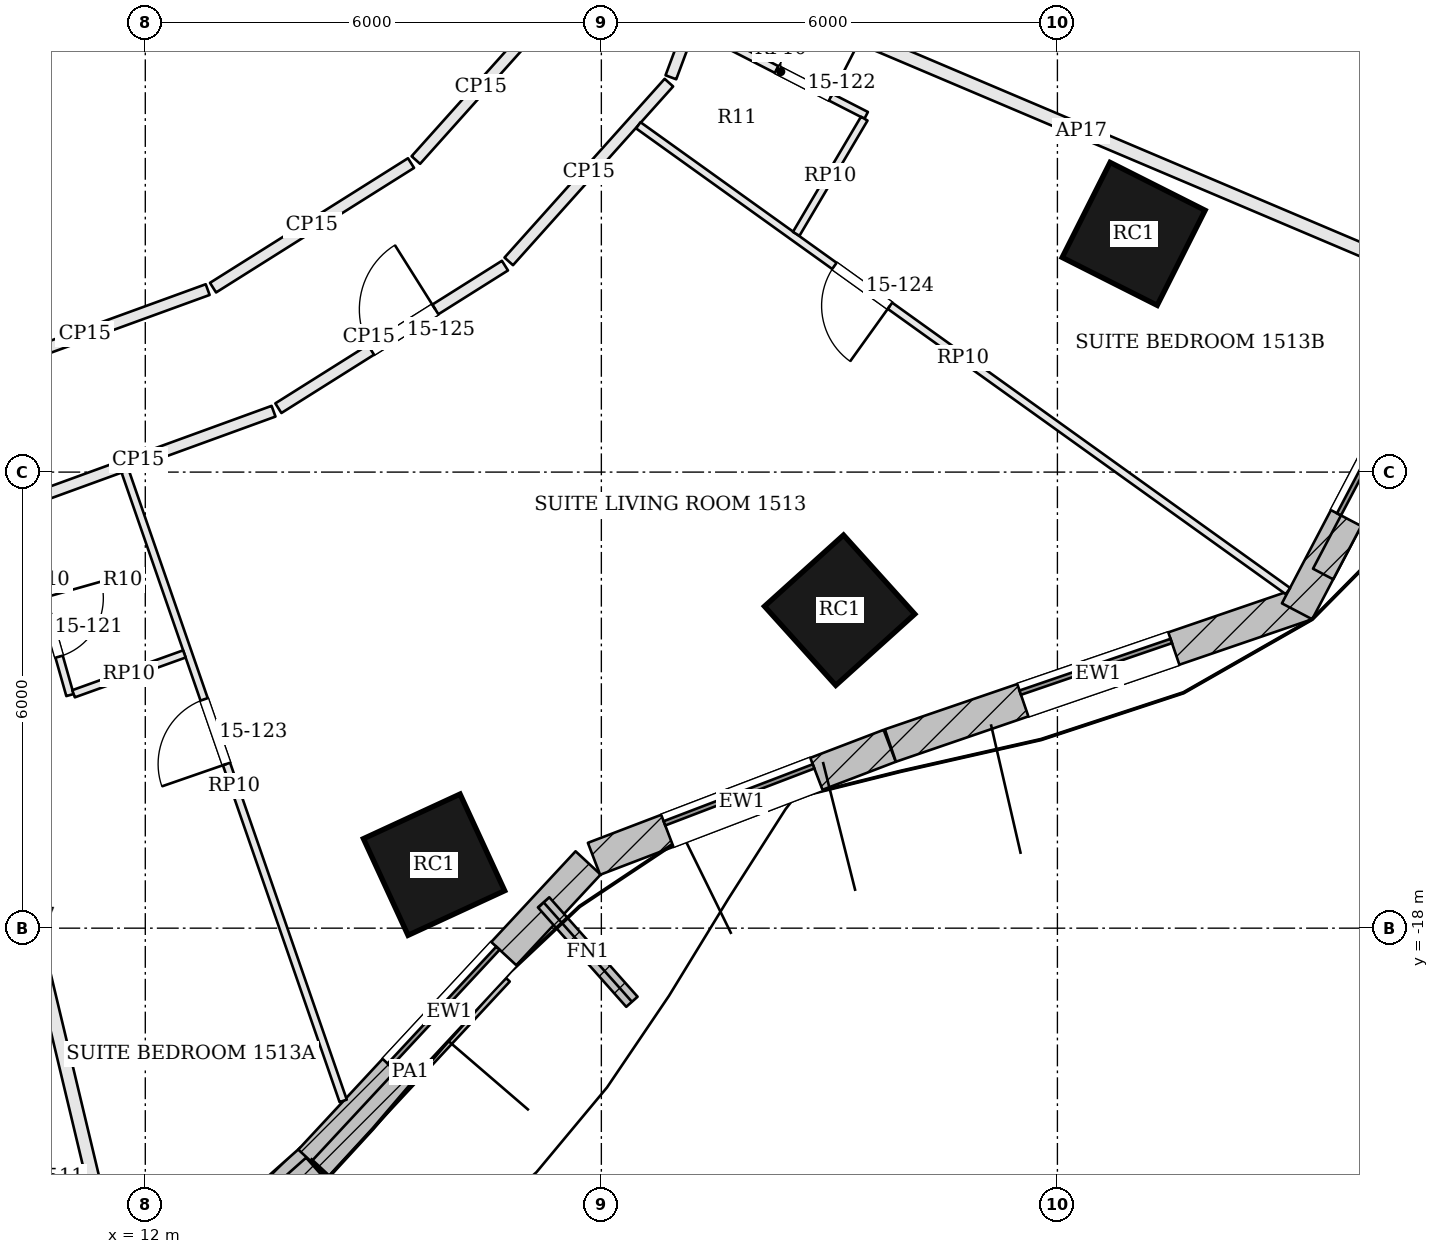
"""IFC4 building model, lengths in metres.
Left out: names, types, materials, properties, quantities, classifications, styles, units other than length and angle.
Written with IfcOpenShell. Run it as: python <this file> out.ifc"""

import sys

from ifc_helpers import new_model, si_unit, direction, frame, frame_2d, origin, origin_2d, place, context, subcontext, project, spatial, rectangle, extrude, element, fill, save


model = new_model("IFC4")
c1 = context("Model", 3, precision=1e-05, world=origin(), true_north=direction((0.0, 1.0)))
c2 = subcontext(c1, "Body", "Model", "MODEL_VIEW")
j1 = project(units=[si_unit("LENGTHUNIT", "METRE"), si_unit("PLANEANGLEUNIT", "RADIAN")], contexts=[c1])
p1 = place(None, origin())
s1 = spatial("IfcSite", under=j1, at=p1, CompositionType="ELEMENT")
p2 = place(p1, origin())
s2 = spatial("IfcBuilding", under=s1, at=p2, CompositionType="ELEMENT")
p3 = place(p2, frame((0.0, 0.0, 69.9)))
s3 = spatial("IfcBuildingStorey", under=s2, at=p3, CompositionType="ELEMENT", Elevation=69.9)
for number, where, z_axis, x_axis in (
    (1, (15.799, -17.165, 0.0), (0.0, 0.0, 1.0), (0.908, 0.419, 0.0)),
    (2, (21.135, -13.817, 0.0), (0.0, 0.0, 1.0), (0.743, 0.67, 0.0)),
    (3, (25.003, -8.866, 0.0), (0.0, 0.0, 1.0), (0.45, 0.893, 0.0)),
):
    element("IfcColumn", number, at=place(p3, frame(where, z_axis=z_axis, x_axis=x_axis)), inside=s3, PredefinedType="COLUMN", context=c2, shape_type="SweptSolid", body=[
        extrude(rectangle(XDim=1.4, YDim=1.4, at=origin_2d()), origin(), (0.0, 0.0, 1.0), 3.6),
    ])
p4 = place(p3, frame((11.763, -23.212, 0.0), z_axis=(0.0, 0.0, 1.0), x_axis=(0.74723528797, 0.664559571755, 0.0)))
e4 = element("IfcWall", 4, at=p4, inside=s3, PredefinedType="SOLIDWALL", context=c2, shape_type="SweptSolid", body=[
    extrude(rectangle(XDim=3.251, YDim=0.45, at=frame_2d((1.625, 0.0))), origin(), (0.0, 0.0, 1.0), 3.4),
])
p5 = place(p4, frame((0.576, 0.0, 0.9)))
e5 = element("IfcOpeningElement", 5, at=p5, cuts=e4, PredefinedType="OPENING", context=c2, shape_type="SweptSolid", body=[
    extrude(rectangle(XDim=2.1, YDim=2.0, at=frame_2d((1.05, 1.0))), frame((0.0, 0.235, 0.0), z_axis=(0.0, -1.0, 0.0), x_axis=(1.0, 0.0, 0.0)), (0.0, 0.0, 1.0), 0.47),
])
p6 = place(p3, frame((14.177, -21.066, 0.0), z_axis=(0.0, 0.0, 1.0), x_axis=(0.680847709714, 0.732425010617, 0.0)))
e6 = element("IfcWall", 6, at=p6, inside=s3, PredefinedType="SOLIDWALL", context=c2, shape_type="SweptSolid", body=[
    extrude(rectangle(XDim=5.358, YDim=0.45, at=frame_2d((2.679, 0.0))), origin(), (0.0, 0.0, 1.0), 3.4),
])
p7 = place(p6, frame((1.629, 0.0, 0.9)))
e7 = element("IfcOpeningElement", 7, at=p7, cuts=e6, PredefinedType="OPENING", context=c2, shape_type="SweptSolid", body=[
    extrude(rectangle(XDim=2.1, YDim=2.0, at=frame_2d((1.05, 1.0))), frame((0.0, 0.235, 0.0), z_axis=(0.0, -1.0, 0.0), x_axis=(1.0, 0.0, 0.0)), (0.0, 0.0, 1.0), 0.47),
])
p8 = place(p3, frame((17.903, -17.087, 0.0), z_axis=(0.0, 0.0, 1.0), x_axis=(0.934145554025, 0.356892258105, 0.0)))
e8 = element("IfcWall", 8, at=p8, inside=s3, PredefinedType="SOLIDWALL", context=c2, shape_type="SweptSolid", body=[
    extrude(rectangle(XDim=4.165, YDim=0.45, at=frame_2d((2.082, 0.0))), origin(), (0.0, 0.0, 1.0), 3.4),
])
p9 = place(p8, frame((1.032, 0.0, 0.9)))
e9 = element("IfcOpeningElement", 9, at=p9, cuts=e8, PredefinedType="OPENING", context=c2, shape_type="SweptSolid", body=[
    extrude(rectangle(XDim=2.1, YDim=2.0, at=frame_2d((1.05, 1.0))), frame((0.0, 0.235, 0.0), z_axis=(0.0, -1.0, 0.0), x_axis=(1.0, 0.0, 0.0)), (0.0, 0.0, 1.0), 0.47),
])
p10 = place(p3, frame((21.803, -15.597, 0.0), z_axis=(0.0, 0.0, 1.0), x_axis=(0.946115314877, 0.323829910532, 0.0)))
e10 = element("IfcWall", 10, at=p10, inside=s3, PredefinedType="SOLIDWALL", context=c2, shape_type="SweptSolid", body=[
    extrude(rectangle(XDim=5.782, YDim=0.45, at=frame_2d((2.891, 0.0))), origin(), (0.0, 0.0, 1.0), 3.4),
])
p11 = place(p10, frame((1.841, 0.0, 0.9)))
e11 = element("IfcOpeningElement", 11, at=p11, cuts=e10, PredefinedType="OPENING", context=c2, shape_type="SweptSolid", body=[
    extrude(rectangle(XDim=2.1, YDim=2.0, at=frame_2d((1.05, 1.0))), frame((0.0, 0.235, 0.0), z_axis=(0.0, -1.0, 0.0), x_axis=(1.0, 0.0, 0.0)), (0.0, 0.0, 1.0), 0.47),
])
p12 = place(p3, frame((27.153, -13.831, 0.0), z_axis=(0.0, 0.0, 1.0), x_axis=(0.465165872942, 0.885223537108, 0.0)))
e12 = element("IfcWall", 12, at=p12, inside=s3, PredefinedType="SOLIDWALL", context=c2, shape_type="SweptSolid", body=[
    extrude(rectangle(XDim=4.871, YDim=0.45, at=frame_2d((2.436, 0.0))), origin(), (0.0, 0.0, 1.0), 3.4),
])
p13 = place(p12, frame((1.385, 0.0, 0.9)))
e13 = element("IfcOpeningElement", 13, at=p13, cuts=e12, PredefinedType="OPENING", context=c2, shape_type="SweptSolid", body=[
    extrude(rectangle(XDim=2.1, YDim=2.0, at=frame_2d((1.05, 1.0))), frame((0.0, 0.235, 0.0), z_axis=(0.0, -1.0, 0.0), x_axis=(1.0, 0.0, 0.0)), (0.0, 0.0, 1.0), 0.47),
])
p14 = place(p3, frame((17.24, -17.66, 0.0), z_axis=(0.0, 0.0, 1.0), x_axis=(0.664017424016, -0.747717099312, 0.0)))
e14 = element("IfcWall", 14, at=p14, inside=s3, PredefinedType="SOLIDWALL", context=c2, shape_type="SweptSolid", body=[
    extrude(rectangle(XDim=1.75, YDim=0.2, at=frame_2d((0.875, 0.0))), origin(), (0.0, 0.0, 1.0), 3.4),
])
p15 = place(p3, frame((11.898, -23.192, 3.6), z_axis=(0.0, 0.0, 1.0), x_axis=(0.74726596591, 0.664525075669, 0.0)))
e15 = element("IfcWall", 15, at=p15, inside=s3, PredefinedType="PARAPET", context=c2, shape_type="SweptSolid", body=[
    extrude(rectangle(XDim=3.101, YDim=0.3, at=frame_2d((1.551, 0.0))), origin(), (0.0, 0.0, 1.0), 1.1),
])
p16 = place(p3, frame((14.293, -21.174, 3.6), z_axis=(0.0, 0.0, 1.0), x_axis=(0.680821476217, 0.732449395877, 0.0)))
e16 = element("IfcWall", 16, at=p16, inside=s3, PredefinedType="PARAPET", context=c2, shape_type="SweptSolid", body=[
    extrude(rectangle(XDim=3.513, YDim=0.3, at=frame_2d((1.757, 0.0))), origin(), (0.0, 0.0, 1.0), 1.1),
])
p17 = place(p3, frame((27.495, -13.341, 3.6), z_axis=(0.0, 0.0, 1.0), x_axis=(0.46519687666, 0.88520724463, 0.0)))
e17 = element("IfcWall", 17, at=p17, inside=s3, PredefinedType="PARAPET", context=c2, shape_type="SweptSolid", body=[
    extrude(rectangle(XDim=4.139, YDim=0.3, at=frame_2d((2.069, 0.0))), origin(), (0.0, 0.0, 1.0), 1.1),
])
p18 = place(p3, frame((11.707, -22.956, 0.0), z_axis=(0.0, 0.0, 1.0), x_axis=(-0.232380654268, 0.972624918209, 0.0)))
e18 = element("IfcWall", 18, at=p18, inside=s3, PredefinedType="PARTITIONING", context=c2, shape_type="SweptSolid", body=[
    extrude(rectangle(XDim=10.507, YDim=0.175, at=frame_2d((5.253, 0.0))), origin(), (0.0, 0.0, 1.0), 2.68),
])
p19 = place(p3, frame((10.128, -12.494, 0.0), z_axis=(0.0, 0.0, 1.0), x_axis=(0.939720005412, 0.341944895309, 0.0)))
e19 = element("IfcWall", 19, at=p19, inside=s3, PredefinedType="PARTITIONING", context=c2, shape_type="SweptSolid", body=[
    extrude(rectangle(XDim=3.788, YDim=0.15, at=frame_2d((1.894, 0.0))), origin(), (0.0, 0.0, 1.0), 2.68),
])
p20 = place(p3, frame((13.751, -11.159, 0.0), z_axis=(0.0, 0.0, 1.0), x_axis=(0.846413381026, 0.532526420396, 0.0)))
e20 = element("IfcWall", 20, at=p20, inside=s3, PredefinedType="PARTITIONING", context=c2, shape_type="SweptSolid", body=[
    extrude(rectangle(XDim=3.522, YDim=0.15, at=frame_2d((1.761, 0.0))), origin(), (0.0, 0.0, 1.0), 2.68),
])
p21 = place(p20, frame((1.44, 0.0, 0.0)))
e21 = element("IfcOpeningElement", 21, at=p21, cuts=e20, PredefinedType="OPENING", context=c2, shape_type="SweptSolid", body=[
    extrude(rectangle(XDim=1.0, YDim=2.1, at=frame_2d((0.5, 1.05))), frame((0.0, 0.085, 0.0), z_axis=(0.0, -1.0, 0.0), x_axis=(1.0, 0.0, 0.0)), (0.0, 0.0, 1.0), 0.17),
])
p22 = place(p3, frame((16.781, -9.228, 0.0), z_axis=(0.0, 0.0, 1.0), x_axis=(0.667305516611, 0.744784094554, 0.0)))
e22 = element("IfcWall", 22, at=p22, inside=s3, PredefinedType="PARTITIONING", context=c2, shape_type="SweptSolid", body=[
    extrude(rectangle(XDim=3.157, YDim=0.15, at=frame_2d((1.579, 0.0))), origin(), (0.0, 0.0, 1.0), 2.68),
])
p23 = place(p3, frame((18.915, -6.806, 0.0), z_axis=(0.0, 0.0, 1.0), x_axis=(0.349345122546, 0.936994122368, 0.0)))
e23 = element("IfcWall", 23, at=p23, inside=s3, PredefinedType="PARTITIONING", context=c2, shape_type="SweptSolid", body=[
    extrude(rectangle(XDim=1.46, YDim=0.15, at=frame_2d((0.73, 0.0))), origin(), (0.0, 0.0, 1.0), 2.68),
])
p24 = place(p3, frame((29.139, -9.557, 0.0), z_axis=(0.0, 0.0, 1.0), x_axis=(-0.920644988054, 0.390400827318, 0.0)))
e24 = element("IfcWall", 24, at=p24, inside=s3, PredefinedType="PARTITIONING", context=c2, shape_type="SweptSolid", body=[
    extrude(rectangle(XDim=10.477, YDim=0.175, at=frame_2d((5.238, 0.0))), origin(), (0.0, 0.0, 1.0), 2.68),
])
p25 = place(p3, frame((17.271, -5.984, 0.0), z_axis=(0.0, 0.0, 1.0), x_axis=(-0.667301130907, -0.744788023997, 0.0)))
e25 = element("IfcWall", 25, at=p25, inside=s3, PredefinedType="PARTITIONING", context=c2, shape_type="SweptSolid", body=[
    extrude(rectangle(XDim=2.565, YDim=0.15, at=frame_2d((1.282, 0.0))), origin(), (0.0, 0.0, 1.0), 2.68),
])
p26 = place(p3, frame((15.496, -7.934, 0.0), z_axis=(0.0, 0.0, 1.0), x_axis=(-0.846358667139, -0.532613374371, 0.0)))
e26 = element("IfcWall", 26, at=p26, inside=s3, PredefinedType="PARTITIONING", context=c2, shape_type="SweptSolid", body=[
    extrude(rectangle(XDim=3.078, YDim=0.15, at=frame_2d((1.539, 0.0))), origin(), (0.0, 0.0, 1.0), 2.68),
])
p27 = place(p3, frame((12.821, -9.599, 0.0), z_axis=(0.0, 0.0, 1.0), x_axis=(-0.939712560326, -0.341965354921, 0.0)))
e27 = element("IfcWall", 27, at=p27, inside=s3, PredefinedType="PARTITIONING", context=c2, shape_type="SweptSolid", body=[
    extrude(rectangle(XDim=3.439, YDim=0.15, at=frame_2d((1.719, 0.0))), origin(), (0.0, 0.0, 1.0), 2.68),
])
p28 = place(p3, frame((14.603, -20.272, 0.0), z_axis=(0.0, 0.0, 1.0), x_axis=(-0.327253103395, 0.944936720801, 0.0)))
e28 = element("IfcWall", 28, at=p28, inside=s3, PredefinedType="PARTITIONING", context=c2, shape_type="SweptSolid", body=[
    extrude(rectangle(XDim=8.765, YDim=0.1, at=frame_2d((4.383, 0.0))), origin(), (0.0, 0.0, 1.0), 2.898),
])
p29 = place(p28, frame((4.69, 0.0, 0.0)))
e29 = element("IfcOpeningElement", 29, at=p29, cuts=e28, PredefinedType="OPENING", context=c2, shape_type="SweptSolid", body=[
    extrude(rectangle(XDim=0.9, YDim=2.4, at=frame_2d((0.45, 1.2))), frame((0.0, 0.06, 0.0), z_axis=(0.0, -1.0, 0.0), x_axis=(1.0, 0.0, 0.0)), (0.0, 0.0, 1.0), 0.12),
])
p30 = place(p3, frame((27.033, -13.565, 0.0), z_axis=(0.0, 0.0, 1.0), x_axis=(-0.812696934536, 0.582686616112, 0.0)))
e30 = element("IfcWall", 30, at=p30, inside=s3, PredefinedType="PARTITIONING", context=c2, shape_type="SweptSolid", body=[
    extrude(rectangle(XDim=10.517, YDim=0.1, at=frame_2d((5.258, 0.0))), origin(), (0.0, 0.0, 1.0), 2.898),
])
p31 = place(p30, frame((6.442, 0.0, 0.0)))
e31 = element("IfcOpeningElement", 31, at=p31, cuts=e30, PredefinedType="OPENING", context=c2, shape_type="SweptSolid", body=[
    extrude(rectangle(XDim=0.9, YDim=2.4, at=frame_2d((0.45, 1.2))), frame((0.0, 0.06, 0.0), z_axis=(0.0, -1.0, 0.0), x_axis=(1.0, 0.0, 0.0)), (0.0, 0.0, 1.0), 0.12),
])
p32 = place(p3, frame((10.321, -12.504, 0.0), z_axis=(0.0, 0.0, 1.0), x_axis=(0.272498138777, -0.962156309735, 0.0)))
e32 = element("IfcWall", 32, at=p32, inside=s3, PredefinedType="PARTITIONING", context=c2, shape_type="SweptSolid", body=[
    extrude(rectangle(XDim=2.525, YDim=0.1, at=frame_2d((1.262, 0.0))), origin(), (0.0, 0.0, 1.0), 2.898),
])
p33 = place(p32, frame((1.2, 0.0, 0.0)))
e33 = element("IfcOpeningElement", 33, at=p33, cuts=e32, PredefinedType="OPENING", context=c2, shape_type="SweptSolid", body=[
    extrude(rectangle(XDim=0.8, YDim=2.1, at=frame_2d((0.4, 1.05))), frame((0.0, 0.06, 0.0), z_axis=(0.0, -1.0, 0.0), x_axis=(1.0, 0.0, 0.0)), (0.0, 0.0, 1.0), 0.12),
])
p34 = place(p3, frame((11.056, -14.916, 0.0), z_axis=(0.0, 0.0, 1.0), x_axis=(0.941066094494, 0.338222716259, 0.0)))
e34 = element("IfcWall", 34, at=p34, inside=s3, PredefinedType="PARTITIONING", context=c2, shape_type="SweptSolid", body=[
    extrude(rectangle(XDim=1.549, YDim=0.1, at=frame_2d((0.774, 0.0))), origin(), (0.0, 0.0, 1.0), 2.898),
])
p35 = place(p3, frame((19.237, -6.156, 0.0), z_axis=(0.0, 0.0, 1.0), x_axis=(0.890073027503, -0.455817952379, 0.0)))
e35 = element("IfcWall", 35, at=p35, inside=s3, PredefinedType="PARTITIONING", context=c2, shape_type="SweptSolid", body=[
    extrude(rectangle(XDim=2.525, YDim=0.1, at=frame_2d((1.262, 0.0))), origin(), (0.0, 0.0, 1.0), 2.898),
])
p36 = place(p35, frame((1.2, 0.0, 0.0)))
e36 = element("IfcOpeningElement", 36, at=p36, cuts=e35, PredefinedType="OPENING", context=c2, shape_type="SweptSolid", body=[
    extrude(rectangle(XDim=0.8, YDim=2.1, at=frame_2d((0.4, 1.05))), frame((0.0, 0.06, 0.0), z_axis=(0.0, -1.0, 0.0), x_axis=(1.0, 0.0, 0.0)), (0.0, 0.0, 1.0), 0.12),
])
p37 = place(p3, frame((21.459, -7.35, 0.0), z_axis=(0.0, 0.0, 1.0), x_axis=(-0.508631201266, -0.860984495272, 0.0)))
e37 = element("IfcWall", 37, at=p37, inside=s3, PredefinedType="PARTITIONING", context=c2, shape_type="SweptSolid", body=[
    extrude(rectangle(XDim=1.761, YDim=0.1, at=frame_2d((0.88, 0.0))), origin(), (0.0, 0.0, 1.0), 2.898),
])
p38 = place(p7, origin())
e38 = element("IfcWindow", 38, at=p38, inside=s3, PartitioningType="SINGLE_PANEL", PredefinedType="WINDOW", context=c2, shape_type="SweptSolid", body=[
    extrude(rectangle(XDim=2.1, YDim=2.0, at=frame_2d((1.05, 1.0))), frame((0.0, 0.135, 0.0), z_axis=(0.0, -1.0, 0.0), x_axis=(1.0, 0.0, 0.0)), (0.0, 0.0, 1.0), 0.06),
])
fill(e7, e38)
p39 = place(p9, origin())
e39 = element("IfcWindow", 39, at=p39, inside=s3, PartitioningType="SINGLE_PANEL", PredefinedType="WINDOW", context=c2, shape_type="SweptSolid", body=[
    extrude(rectangle(XDim=2.1, YDim=2.0, at=frame_2d((1.05, 1.0))), frame((0.0, 0.135, 0.0), z_axis=(0.0, -1.0, 0.0), x_axis=(1.0, 0.0, 0.0)), (0.0, 0.0, 1.0), 0.06),
])
fill(e9, e39)
p40 = place(p11, origin())
e40 = element("IfcWindow", 40, at=p40, inside=s3, PartitioningType="SINGLE_PANEL", PredefinedType="WINDOW", context=c2, shape_type="SweptSolid", body=[
    extrude(rectangle(XDim=2.1, YDim=2.0, at=frame_2d((1.05, 1.0))), frame((0.0, 0.135, 0.0), z_axis=(0.0, -1.0, 0.0), x_axis=(1.0, 0.0, 0.0)), (0.0, 0.0, 1.0), 0.06),
])
fill(e11, e40)
p41 = place(p13, origin())
e41 = element("IfcWindow", 41, at=p41, inside=s3, PartitioningType="SINGLE_PANEL", PredefinedType="WINDOW", context=c2, shape_type="SweptSolid", body=[
    extrude(rectangle(XDim=2.1, YDim=2.0, at=frame_2d((1.05, 1.0))), frame((0.0, 0.135, 0.0), z_axis=(0.0, -1.0, 0.0), x_axis=(1.0, 0.0, 0.0)), (0.0, 0.0, 1.0), 0.06),
])
fill(e13, e41)
p42 = place(p33, origin())
e42 = element("IfcDoor", 42, at=p42, inside=s3, OperationType="SINGLE_SWING_LEFT", PredefinedType="DOOR", context=c2, shape_type="SweptSolid", body=[
    extrude(rectangle(XDim=0.8, YDim=2.1, at=frame_2d((0.4, 1.05))), frame((0.0, 0.025, 0.0), z_axis=(0.0, -1.0, 0.0), x_axis=(1.0, 0.0, 0.0)), (0.0, 0.0, 1.0), 0.05),
])
fill(e33, e42)
p43 = place(p36, origin())
e43 = element("IfcDoor", 43, at=p43, inside=s3, OperationType="SINGLE_SWING_RIGHT", PredefinedType="DOOR", context=c2, shape_type="SweptSolid", body=[
    extrude(rectangle(XDim=0.8, YDim=2.1, at=frame_2d((0.4, 1.05))), frame((0.0, 0.025, 0.0), z_axis=(0.0, -1.0, 0.0), x_axis=(1.0, 0.0, 0.0)), (0.0, 0.0, 1.0), 0.05),
])
fill(e36, e43)
p44 = place(p29, origin())
e44 = element("IfcDoor", 44, at=p44, inside=s3, OperationType="SINGLE_SWING_LEFT", PredefinedType="DOOR", context=c2, shape_type="SweptSolid", body=[
    extrude(rectangle(XDim=0.9, YDim=2.4, at=frame_2d((0.45, 1.2))), frame((0.0, 0.025, 0.0), z_axis=(0.0, -1.0, 0.0), x_axis=(1.0, 0.0, 0.0)), (0.0, 0.0, 1.0), 0.05),
])
fill(e29, e44)
p45 = place(p31, origin())
e45 = element("IfcDoor", 45, at=p45, inside=s3, OperationType="SINGLE_SWING_LEFT", PredefinedType="DOOR", context=c2, shape_type="SweptSolid", body=[
    extrude(rectangle(XDim=0.9, YDim=2.4, at=frame_2d((0.45, 1.2))), frame((0.0, 0.025, 0.0), z_axis=(0.0, -1.0, 0.0), x_axis=(1.0, 0.0, 0.0)), (0.0, 0.0, 1.0), 0.05),
])
fill(e31, e45)
p46 = place(p21, origin())
e46 = element("IfcDoor", 46, at=p46, inside=s3, OperationType="SINGLE_SWING_RIGHT", PredefinedType="DOOR", context=c2, shape_type="SweptSolid", body=[
    extrude(rectangle(XDim=1.0, YDim=2.1, at=frame_2d((0.5, 1.05))), frame((0.0, 0.025, 0.0), z_axis=(0.0, -1.0, 0.0), x_axis=(1.0, 0.0, 0.0)), (0.0, 0.0, 1.0), 0.05),
])
fill(e21, e46)
save(model, sys.argv[1])
